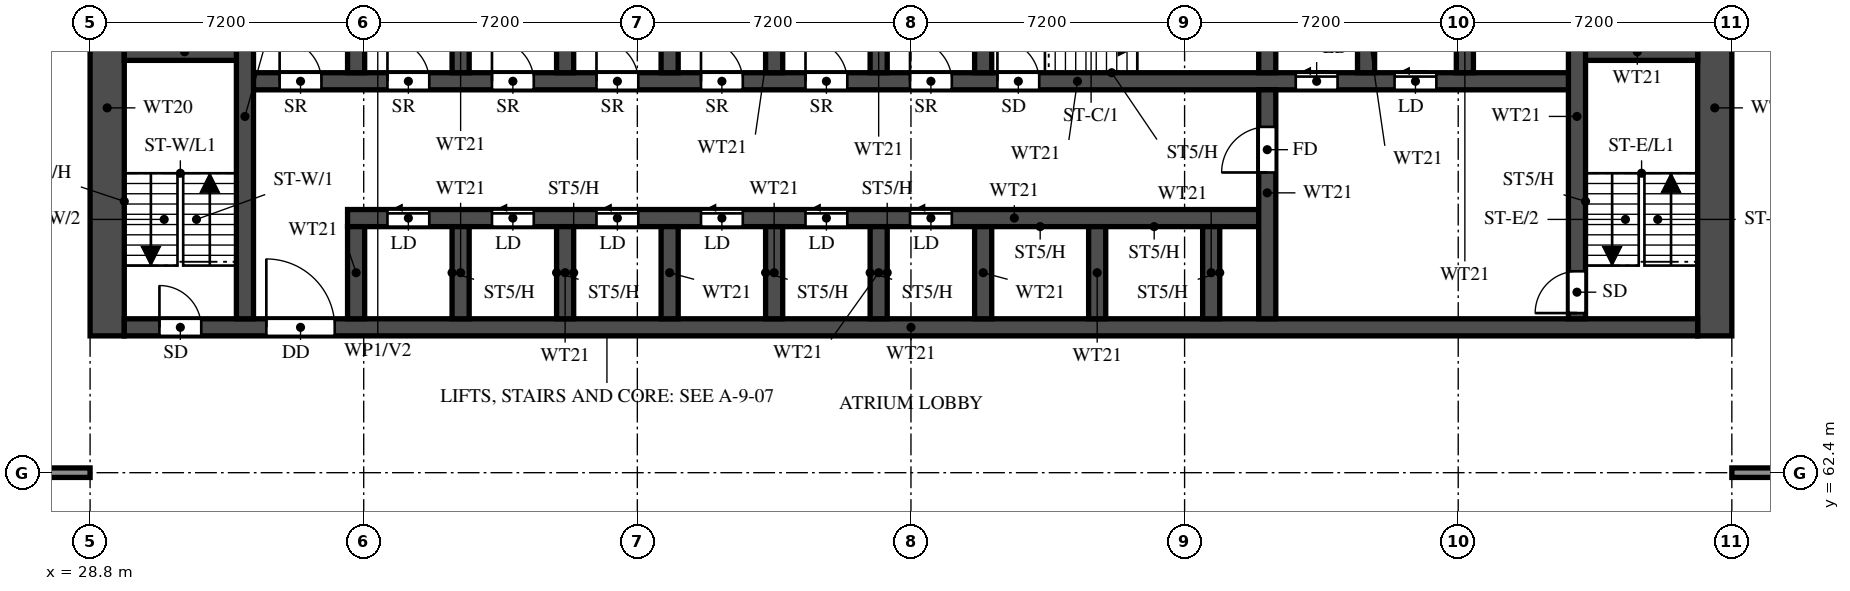
"""IFC4 building model, lengths in metres.
Left out: names, types, materials, properties, quantities, classifications, styles, units other than length and angle.
Written with IfcOpenShell. Run it as: python <this file> out.ifc"""

import sys

from ifc_helpers import new_model, si_unit, direction, frame, frame_2d, origin, place, context, subcontext, project, spatial, rectangle, extrude, element, fill, save


model = new_model("IFC4")
c1 = context("Model", 3, precision=1e-05, world=origin(), true_north=direction((0.0, 1.0)))
c2 = subcontext(c1, "Body", "Model", "MODEL_VIEW")
j1 = project(units=[si_unit("LENGTHUNIT", "METRE"), si_unit("PLANEANGLEUNIT", "RADIAN")], contexts=[c1])
p1 = place(None, origin())
s1 = spatial("IfcSite", under=j1, at=p1, CompositionType="ELEMENT")
p2 = place(p1, origin())
s2 = spatial("IfcBuilding", under=s1, at=p2, CompositionType="ELEMENT")
p3 = place(p2, frame((0.0, 0.0, 27.0)))
s3 = spatial("IfcBuildingStorey", under=s2, at=p3, CompositionType="ELEMENT", Elevation=27.0)
for number, where, z_axis, x_axis in (
    (1, (29.25, 66.0, 0.0), (0.0, 0.0, 1.0), (0.0, 1.0, 0.0)),
    (2, (71.55, 66.0, 0.0), (0.0, 0.0, 1.0), (0.0, 1.0, 0.0)),
):
    element("IfcWall", number, at=place(p3, frame(where, z_axis=z_axis, x_axis=x_axis)), inside=s3, PredefinedType="SHEAR", context=c2, shape_type="SweptSolid", body=[
        extrude(rectangle(XDim=12.0, YDim=0.9, at=frame_2d((6.0, 0.0))), origin(), (0.0, 0.0, 1.0), 3.18),
    ])
p4 = place(p3, frame((29.7, 66.225, 0.0), z_axis=(0.0, 0.0, 1.0), x_axis=(1.0, 0.0, 0.0)))
e3 = element("IfcWall", 3, at=p4, inside=s3, PredefinedType="SHEAR", context=c2, shape_type="SweptSolid", body=[
    extrude(rectangle(XDim=41.4, YDim=0.45, at=frame_2d((20.7, 0.0))), origin(), (0.0, 0.0, 1.0), 3.18),
])
p5 = place(p4, frame((0.925, 0.0, 0.0)))
e4 = element("IfcOpeningElement", 4, at=p5, cuts=e3, PredefinedType="OPENING", context=c2, shape_type="SweptSolid", body=[
    extrude(rectangle(XDim=1.1, YDim=2.1, at=frame_2d((0.55, 1.05))), frame((0.0, 0.235, 0.0), z_axis=(0.0, -1.0, 0.0), x_axis=(1.0, 0.0, 0.0)), (0.0, 0.0, 1.0), 0.47),
])
p6 = place(p4, frame((3.738, 0.0, 0.0)))
e5 = element("IfcOpeningElement", 5, at=p6, cuts=e3, PredefinedType="OPENING", context=c2, shape_type="SweptSolid", body=[
    extrude(rectangle(XDim=1.8, YDim=2.1, at=frame_2d((0.9, 1.05))), frame((0.0, 0.235, 0.0), z_axis=(0.0, -1.0, 0.0), x_axis=(1.0, 0.0, 0.0)), (0.0, 0.0, 1.0), 0.47),
])
p7 = place(p3, frame((35.575, 69.1, 0.0), z_axis=(0.0, 0.0, 1.0), x_axis=(1.0, 0.0, 0.0)))
e6 = element("IfcWall", 6, at=p7, inside=s3, PredefinedType="SHEAR", context=c2, shape_type="SweptSolid", body=[
    extrude(rectangle(XDim=24.2, YDim=0.45, at=frame_2d((12.1, 0.0))), origin(), (0.0, 0.0, 1.0), 3.18),
])
p8 = place(p7, frame((1.05, 0.0, 0.0)))
e7 = element("IfcOpeningElement", 7, at=p8, cuts=e6, PredefinedType="OPENING", context=c2, shape_type="SweptSolid", body=[
    extrude(rectangle(XDim=1.1, YDim=2.1, at=frame_2d((0.55, 1.05))), frame((0.0, 0.235, 0.0), z_axis=(0.0, -1.0, 0.0), x_axis=(1.0, 0.0, 0.0)), (0.0, 0.0, 1.0), 0.47),
])
p9 = place(p7, frame((3.8, 0.0, 0.0)))
e8 = element("IfcOpeningElement", 8, at=p9, cuts=e6, PredefinedType="OPENING", context=c2, shape_type="SweptSolid", body=[
    extrude(rectangle(XDim=1.1, YDim=2.1, at=frame_2d((0.55, 1.05))), frame((0.0, 0.235, 0.0), z_axis=(0.0, -1.0, 0.0), x_axis=(1.0, 0.0, 0.0)), (0.0, 0.0, 1.0), 0.47),
])
p10 = place(p7, frame((6.55, 0.0, 0.0)))
e9 = element("IfcOpeningElement", 9, at=p10, cuts=e6, PredefinedType="OPENING", context=c2, shape_type="SweptSolid", body=[
    extrude(rectangle(XDim=1.1, YDim=2.1, at=frame_2d((0.55, 1.05))), frame((0.0, 0.235, 0.0), z_axis=(0.0, -1.0, 0.0), x_axis=(1.0, 0.0, 0.0)), (0.0, 0.0, 1.0), 0.47),
])
p11 = place(p7, frame((9.3, 0.0, 0.0)))
e10 = element("IfcOpeningElement", 10, at=p11, cuts=e6, PredefinedType="OPENING", context=c2, shape_type="SweptSolid", body=[
    extrude(rectangle(XDim=1.1, YDim=2.1, at=frame_2d((0.55, 1.05))), frame((0.0, 0.235, 0.0), z_axis=(0.0, -1.0, 0.0), x_axis=(1.0, 0.0, 0.0)), (0.0, 0.0, 1.0), 0.47),
])
p12 = place(p7, frame((12.05, 0.0, 0.0)))
e11 = element("IfcOpeningElement", 11, at=p12, cuts=e6, PredefinedType="OPENING", context=c2, shape_type="SweptSolid", body=[
    extrude(rectangle(XDim=1.1, YDim=2.1, at=frame_2d((0.55, 1.05))), frame((0.0, 0.235, 0.0), z_axis=(0.0, -1.0, 0.0), x_axis=(1.0, 0.0, 0.0)), (0.0, 0.0, 1.0), 0.47),
])
p13 = place(p7, frame((14.8, 0.0, 0.0)))
e12 = element("IfcOpeningElement", 12, at=p13, cuts=e6, PredefinedType="OPENING", context=c2, shape_type="SweptSolid", body=[
    extrude(rectangle(XDim=1.1, YDim=2.1, at=frame_2d((0.55, 1.05))), frame((0.0, 0.235, 0.0), z_axis=(0.0, -1.0, 0.0), x_axis=(1.0, 0.0, 0.0)), (0.0, 0.0, 1.0), 0.47),
])
p14 = place(p3, frame((32.875, 72.7, 0.0), z_axis=(0.0, 0.0, 1.0), x_axis=(1.0, 0.0, 0.0)))
e13 = element("IfcWall", 13, at=p14, inside=s3, PredefinedType="SHEAR", context=c2, shape_type="SweptSolid", body=[
    extrude(rectangle(XDim=35.05, YDim=0.45, at=frame_2d((17.525, 0.0))), origin(), (0.0, 0.0, 1.0), 3.18),
])
p15 = place(p14, frame((19.8, 0.0, 0.0)))
e14 = element("IfcOpeningElement", 14, at=p15, cuts=e13, PredefinedType="OPENING", context=c2, shape_type="SweptSolid", body=[
    extrude(rectangle(XDim=1.1, YDim=2.1, at=frame_2d((0.55, 1.05))), frame((0.0, 0.235, 0.0), z_axis=(0.0, -1.0, 0.0), x_axis=(1.0, 0.0, 0.0)), (0.0, 0.0, 1.0), 0.47),
])
p16 = place(p14, frame((27.65, 0.0, 0.0)))
e15 = element("IfcOpeningElement", 15, at=p16, cuts=e13, PredefinedType="OPENING", context=c2, shape_type="SweptSolid", body=[
    extrude(rectangle(XDim=1.1, YDim=2.1, at=frame_2d((0.55, 1.05))), frame((0.0, 0.235, 0.0), z_axis=(0.0, -1.0, 0.0), x_axis=(1.0, 0.0, 0.0)), (0.0, 0.0, 1.0), 0.47),
])
p17 = place(p14, frame((30.25, 0.0, 0.0)))
e16 = element("IfcOpeningElement", 16, at=p17, cuts=e13, PredefinedType="OPENING", context=c2, shape_type="SweptSolid", body=[
    extrude(rectangle(XDim=1.1, YDim=2.1, at=frame_2d((0.55, 1.05))), frame((0.0, 0.235, 0.0), z_axis=(0.0, -1.0, 0.0), x_axis=(1.0, 0.0, 0.0)), (0.0, 0.0, 1.0), 0.47),
])
p18 = place(p14, frame((3.75, 0.0, 0.0)))
e17 = element("IfcOpeningElement", 17, at=p18, cuts=e13, PredefinedType="OPENING", context=c2, shape_type="SweptSolid", body=[
    extrude(rectangle(XDim=1.1, YDim=2.1, at=frame_2d((0.55, 1.05))), frame((0.0, 0.235, 0.0), z_axis=(0.0, -1.0, 0.0), x_axis=(1.0, 0.0, 0.0)), (0.0, 0.0, 1.0), 0.47),
])
p19 = place(p14, frame((6.5, 0.0, 0.0)))
e18 = element("IfcOpeningElement", 18, at=p19, cuts=e13, PredefinedType="OPENING", context=c2, shape_type="SweptSolid", body=[
    extrude(rectangle(XDim=1.1, YDim=2.1, at=frame_2d((0.55, 1.05))), frame((0.0, 0.235, 0.0), z_axis=(0.0, -1.0, 0.0), x_axis=(1.0, 0.0, 0.0)), (0.0, 0.0, 1.0), 0.47),
])
p20 = place(p14, frame((9.25, 0.0, 0.0)))
e19 = element("IfcOpeningElement", 19, at=p20, cuts=e13, PredefinedType="OPENING", context=c2, shape_type="SweptSolid", body=[
    extrude(rectangle(XDim=1.1, YDim=2.1, at=frame_2d((0.55, 1.05))), frame((0.0, 0.235, 0.0), z_axis=(0.0, -1.0, 0.0), x_axis=(1.0, 0.0, 0.0)), (0.0, 0.0, 1.0), 0.47),
])
p21 = place(p14, frame((12.0, 0.0, 0.0)))
e20 = element("IfcOpeningElement", 20, at=p21, cuts=e13, PredefinedType="OPENING", context=c2, shape_type="SweptSolid", body=[
    extrude(rectangle(XDim=1.1, YDim=2.1, at=frame_2d((0.55, 1.05))), frame((0.0, 0.235, 0.0), z_axis=(0.0, -1.0, 0.0), x_axis=(1.0, 0.0, 0.0)), (0.0, 0.0, 1.0), 0.47),
])
p22 = place(p14, frame((14.75, 0.0, 0.0)))
e21 = element("IfcOpeningElement", 21, at=p22, cuts=e13, PredefinedType="OPENING", context=c2, shape_type="SweptSolid", body=[
    extrude(rectangle(XDim=1.1, YDim=2.1, at=frame_2d((0.55, 1.05))), frame((0.0, 0.235, 0.0), z_axis=(0.0, -1.0, 0.0), x_axis=(1.0, 0.0, 0.0)), (0.0, 0.0, 1.0), 0.47),
])
p23 = place(p14, frame((17.5, 0.0, 0.0)))
e22 = element("IfcOpeningElement", 22, at=p23, cuts=e13, PredefinedType="OPENING", context=c2, shape_type="SweptSolid", body=[
    extrude(rectangle(XDim=1.1, YDim=2.1, at=frame_2d((0.55, 1.05))), frame((0.0, 0.235, 0.0), z_axis=(0.0, -1.0, 0.0), x_axis=(1.0, 0.0, 0.0)), (0.0, 0.0, 1.0), 0.47),
])
p24 = place(p14, frame((0.913, 0.0, 0.0)))
e23 = element("IfcOpeningElement", 23, at=p24, cuts=e13, PredefinedType="OPENING", context=c2, shape_type="SweptSolid", body=[
    extrude(rectangle(XDim=1.1, YDim=2.1, at=frame_2d((0.55, 1.05))), frame((0.0, 0.235, 0.0), z_axis=(0.0, -1.0, 0.0), x_axis=(1.0, 0.0, 0.0)), (0.0, 0.0, 1.0), 0.47),
])
for number, where, z_axis, x_axis in (
    (24, (29.7, 73.475, 0.0), (0.0, 0.0, 1.0), (1.0, 0.0, 0.0)),
    (25, (67.925, 73.475, 0.0), (0.0, 0.0, 1.0), (1.0, 0.0, 0.0)),
):
    element("IfcWall", number, at=place(p3, frame(where, z_axis=z_axis, x_axis=x_axis)), inside=s3, PredefinedType="SHEAR", context=c2, shape_type="SweptSolid", body=[
        extrude(rectangle(XDim=3.175, YDim=0.45, at=frame_2d((1.587, 0.0))), origin(), (0.0, 0.0, 1.0), 3.18),
    ])
p25 = place(p3, frame((32.875, 66.45, 0.0), z_axis=(0.0, 0.0, 1.0), x_axis=(0.0, 1.0, 0.0)))
e26 = element("IfcWall", 26, at=p25, inside=s3, PredefinedType="SHEAR", context=c2, shape_type="SweptSolid", body=[
    extrude(rectangle(XDim=10.65, YDim=0.45, at=frame_2d((5.325, 0.0))), origin(), (0.0, 0.0, 1.0), 3.18),
])
p26 = place(p3, frame((67.925, 66.45, 0.0), z_axis=(0.0, 0.0, 1.0), x_axis=(0.0, 1.0, 0.0)))
e27 = element("IfcWall", 27, at=p26, inside=s3, PredefinedType="SHEAR", context=c2, shape_type="SweptSolid", body=[
    extrude(rectangle(XDim=10.65, YDim=0.45, at=frame_2d((5.325, 0.0))), origin(), (0.0, 0.0, 1.0), 3.18),
])
p27 = place(p26, frame((0.15, 0.0, 0.0)))
e28 = element("IfcOpeningElement", 28, at=p27, cuts=e27, PredefinedType="OPENING", context=c2, shape_type="SweptSolid", body=[
    extrude(rectangle(XDim=1.1, YDim=2.1, at=frame_2d((0.55, 1.05))), frame((0.0, 0.235, 0.0), z_axis=(0.0, -1.0, 0.0), x_axis=(1.0, 0.0, 0.0)), (0.0, 0.0, 1.0), 0.47),
])
p28 = place(p3, frame((59.775, 66.45, 0.0), z_axis=(0.0, 0.0, 1.0), x_axis=(0.0, 1.0, 0.0)))
e29 = element("IfcWall", 29, at=p28, inside=s3, PredefinedType="SHEAR", context=c2, shape_type="SweptSolid", body=[
    extrude(rectangle(XDim=6.025, YDim=0.45, at=frame_2d((3.013, 0.0))), origin(), (0.0, 0.0, 1.0), 3.18),
])
p29 = place(p28, frame((3.85, 0.0, 0.0)))
e30 = element("IfcOpeningElement", 30, at=p29, cuts=e29, PredefinedType="OPENING", context=c2, shape_type="SweptSolid", body=[
    extrude(rectangle(XDim=1.2, YDim=2.1, at=frame_2d((0.6, 1.05))), frame((0.0, 0.235, 0.0), z_axis=(0.0, -1.0, 0.0), x_axis=(1.0, 0.0, 0.0)), (0.0, 0.0, 1.0), 0.47),
])
p30 = place(p3, frame((59.775, 72.925, 0.0), z_axis=(0.0, 0.0, 1.0), x_axis=(0.0, 1.0, 0.0)))
e31 = element("IfcWall", 31, at=p30, inside=s3, PredefinedType="SHEAR", context=c2, shape_type="SweptSolid", body=[
    extrude(rectangle(XDim=2.95, YDim=0.45, at=frame_2d((1.475, 0.0))), origin(), (0.0, 0.0, 1.0), 3.18),
])
for number, where, z_axis, x_axis in (
    (32, (35.8, 66.45, 0.0), (0.0, 0.0, 1.0), (0.0, 1.0, 0.0)),
    (33, (38.55, 66.45, 0.0), (0.0, 0.0, 1.0), (0.0, 1.0, 0.0)),
    (34, (41.3, 66.45, 0.0), (0.0, 0.0, 1.0), (0.0, 1.0, 0.0)),
    (35, (44.05, 66.45, 0.0), (0.0, 0.0, 1.0), (0.0, 1.0, 0.0)),
    (36, (46.8, 66.45, 0.0), (0.0, 0.0, 1.0), (0.0, 1.0, 0.0)),
    (37, (49.55, 66.45, 0.0), (0.0, 0.0, 1.0), (0.0, 1.0, 0.0)),
    (38, (52.3, 66.45, 0.0), (0.0, 0.0, 1.0), (0.0, 1.0, 0.0)),
    (39, (55.3, 66.45, 0.0), (0.0, 0.0, 1.0), (0.0, 1.0, 0.0)),
    (40, (58.3, 66.45, 0.0), (0.0, 0.0, 1.0), (0.0, 1.0, 0.0)),
):
    element("IfcWall", number, at=place(p3, frame(where, z_axis=z_axis, x_axis=x_axis)), inside=s3, PredefinedType="SHEAR", context=c2, shape_type="SweptSolid", body=[
        extrude(rectangle(XDim=2.425, YDim=0.45, at=frame_2d((1.212, 0.0))), origin(), (0.0, 0.0, 1.0), 3.18),
    ])
for number, where, z_axis, x_axis in (
    (41, (35.8, 72.925, 0.0), (0.0, 0.0, 1.0), (0.0, 1.0, 0.0)),
    (42, (38.55, 72.925, 0.0), (0.0, 0.0, 1.0), (0.0, 1.0, 0.0)),
    (43, (41.3, 72.925, 0.0), (0.0, 0.0, 1.0), (0.0, 1.0, 0.0)),
    (44, (44.05, 72.925, 0.0), (0.0, 0.0, 1.0), (0.0, 1.0, 0.0)),
    (45, (46.8, 72.925, 0.0), (0.0, 0.0, 1.0), (0.0, 1.0, 0.0)),
    (46, (49.55, 72.925, 0.0), (0.0, 0.0, 1.0), (0.0, 1.0, 0.0)),
    (47, (52.3, 72.925, 0.0), (0.0, 0.0, 1.0), (0.0, 1.0, 0.0)),
    (48, (62.375, 72.925, 0.0), (0.0, 0.0, 1.0), (0.0, 1.0, 0.0)),
    (49, (64.975, 72.925, 0.0), (0.0, 0.0, 1.0), (0.0, 1.0, 0.0)),
):
    element("IfcWall", number, at=place(p3, frame(where, z_axis=z_axis, x_axis=x_axis)), inside=s3, PredefinedType="SHEAR", context=c2, shape_type="SweptSolid", body=[
        extrude(rectangle(XDim=2.95, YDim=0.45, at=frame_2d((1.475, 0.0))), origin(), (0.0, 0.0, 1.0), 3.18),
    ])
p31 = place(p3, frame((14.57, 62.4, 0.0), z_axis=(0.0, 0.0, 1.0), x_axis=(1.0, 0.0, 0.0)))
e50 = element("IfcWall", 50, at=p31, inside=s3, PredefinedType="SOLIDWALL", context=c2, shape_type="SweptSolid", body=[
    extrude(rectangle(XDim=14.23, YDim=0.25, at=frame_2d((7.115, 0.0))), origin(), (0.0, 0.0, 1.0), 3.18),
])
p32 = place(p31, frame((5.08, 0.0, 0.0)))
e51 = element("IfcOpeningElement", 51, at=p32, cuts=e50, PredefinedType="OPENING", context=c2, shape_type="SweptSolid", body=[
    extrude(rectangle(XDim=1.1, YDim=2.1, at=frame_2d((0.55, 1.05))), frame((0.0, 0.135, 0.0), z_axis=(0.0, -1.0, 0.0), x_axis=(1.0, 0.0, 0.0)), (0.0, 0.0, 1.0), 0.27),
])
p33 = place(p3, frame((72.0, 62.4, 0.0), z_axis=(0.0, 0.0, 1.0), x_axis=(1.0, 0.0, 0.0)))
e52 = element("IfcWall", 52, at=p33, inside=s3, PredefinedType="SOLIDWALL", context=c2, shape_type="SweptSolid", body=[
    extrude(rectangle(XDim=14.23, YDim=0.25, at=frame_2d((7.115, 0.0))), origin(), (0.0, 0.0, 1.0), 3.18),
])
p34 = place(p33, frame((5.25, 0.0, 0.0)))
e53 = element("IfcOpeningElement", 53, at=p34, cuts=e52, PredefinedType="OPENING", context=c2, shape_type="SweptSolid", body=[
    extrude(rectangle(XDim=1.1, YDim=2.1, at=frame_2d((0.55, 1.05))), frame((0.0, 0.135, 0.0), z_axis=(0.0, -1.0, 0.0), x_axis=(1.0, 0.0, 0.0)), (0.0, 0.0, 1.0), 0.27),
])
p35 = place(p5, origin())
e54 = element("IfcDoor", 54, at=p35, inside=s3, OperationType="SINGLE_SWING_LEFT", PredefinedType="DOOR", context=c2, shape_type="SweptSolid", body=[
    extrude(rectangle(XDim=1.1, YDim=2.1, at=frame_2d((0.55, 1.05))), frame((0.0, 0.025, 0.0), z_axis=(0.0, -1.0, 0.0), x_axis=(1.0, 0.0, 0.0)), (0.0, 0.0, 1.0), 0.05),
])
fill(e4, e54)
p36 = place(p15, origin())
e55 = element("IfcDoor", 55, at=p36, inside=s3, OperationType="SINGLE_SWING_LEFT", PredefinedType="DOOR", context=c2, shape_type="SweptSolid", body=[
    extrude(rectangle(XDim=1.1, YDim=2.1, at=frame_2d((0.55, 1.05))), frame((0.0, 0.025, 0.0), z_axis=(0.0, -1.0, 0.0), x_axis=(1.0, 0.0, 0.0)), (0.0, 0.0, 1.0), 0.05),
])
fill(e14, e55)
p37 = place(p27, origin())
e56 = element("IfcDoor", 56, at=p37, inside=s3, OperationType="SINGLE_SWING_LEFT", PredefinedType="DOOR", context=c2, shape_type="SweptSolid", body=[
    extrude(rectangle(XDim=1.1, YDim=2.1, at=frame_2d((0.55, 1.05))), frame((0.0, 0.025, 0.0), z_axis=(0.0, -1.0, 0.0), x_axis=(1.0, 0.0, 0.0)), (0.0, 0.0, 1.0), 0.05),
])
fill(e28, e56)
p38 = place(p6, origin())
e57 = element("IfcDoor", 57, at=p38, inside=s3, OperationType="DOUBLE_DOOR_SINGLE_SWING", PredefinedType="DOOR", context=c2, shape_type="SweptSolid", body=[
    extrude(rectangle(XDim=1.8, YDim=2.1, at=frame_2d((0.9, 1.05))), frame((0.0, 0.025, 0.0), z_axis=(0.0, -1.0, 0.0), x_axis=(1.0, 0.0, 0.0)), (0.0, 0.0, 1.0), 0.05),
])
fill(e5, e57)
p39 = place(p29, origin())
e58 = element("IfcDoor", 58, at=p39, inside=s3, OperationType="SINGLE_SWING_RIGHT", PredefinedType="DOOR", context=c2, shape_type="SweptSolid", body=[
    extrude(rectangle(XDim=1.2, YDim=2.1, at=frame_2d((0.6, 1.05))), frame((0.0, 0.025, 0.0), z_axis=(0.0, -1.0, 0.0), x_axis=(1.0, 0.0, 0.0)), (0.0, 0.0, 1.0), 0.05),
])
fill(e30, e58)
p40 = place(p16, origin())
e59 = element("IfcDoor", 59, at=p40, inside=s3, OperationType="SLIDING_TO_LEFT", PredefinedType="DOOR", context=c2, shape_type="SweptSolid", body=[
    extrude(rectangle(XDim=1.1, YDim=2.1, at=frame_2d((0.55, 1.05))), frame((0.0, 0.025, 0.0), z_axis=(0.0, -1.0, 0.0), x_axis=(1.0, 0.0, 0.0)), (0.0, 0.0, 1.0), 0.05),
])
fill(e15, e59)
p41 = place(p17, origin())
e60 = element("IfcDoor", 60, at=p41, inside=s3, OperationType="SLIDING_TO_LEFT", PredefinedType="DOOR", context=c2, shape_type="SweptSolid", body=[
    extrude(rectangle(XDim=1.1, YDim=2.1, at=frame_2d((0.55, 1.05))), frame((0.0, 0.025, 0.0), z_axis=(0.0, -1.0, 0.0), x_axis=(1.0, 0.0, 0.0)), (0.0, 0.0, 1.0), 0.05),
])
fill(e16, e60)
p42 = place(p8, origin())
e61 = element("IfcDoor", 61, at=p42, inside=s3, OperationType="SLIDING_TO_LEFT", PredefinedType="DOOR", context=c2, shape_type="SweptSolid", body=[
    extrude(rectangle(XDim=1.1, YDim=2.1, at=frame_2d((0.55, 1.05))), frame((0.0, 0.025, 0.0), z_axis=(0.0, -1.0, 0.0), x_axis=(1.0, 0.0, 0.0)), (0.0, 0.0, 1.0), 0.05),
])
fill(e7, e61)
p43 = place(p9, origin())
e62 = element("IfcDoor", 62, at=p43, inside=s3, OperationType="SLIDING_TO_LEFT", PredefinedType="DOOR", context=c2, shape_type="SweptSolid", body=[
    extrude(rectangle(XDim=1.1, YDim=2.1, at=frame_2d((0.55, 1.05))), frame((0.0, 0.025, 0.0), z_axis=(0.0, -1.0, 0.0), x_axis=(1.0, 0.0, 0.0)), (0.0, 0.0, 1.0), 0.05),
])
fill(e8, e62)
p44 = place(p10, origin())
e63 = element("IfcDoor", 63, at=p44, inside=s3, OperationType="SLIDING_TO_LEFT", PredefinedType="DOOR", context=c2, shape_type="SweptSolid", body=[
    extrude(rectangle(XDim=1.1, YDim=2.1, at=frame_2d((0.55, 1.05))), frame((0.0, 0.025, 0.0), z_axis=(0.0, -1.0, 0.0), x_axis=(1.0, 0.0, 0.0)), (0.0, 0.0, 1.0), 0.05),
])
fill(e9, e63)
p45 = place(p11, origin())
e64 = element("IfcDoor", 64, at=p45, inside=s3, OperationType="SLIDING_TO_LEFT", PredefinedType="DOOR", context=c2, shape_type="SweptSolid", body=[
    extrude(rectangle(XDim=1.1, YDim=2.1, at=frame_2d((0.55, 1.05))), frame((0.0, 0.025, 0.0), z_axis=(0.0, -1.0, 0.0), x_axis=(1.0, 0.0, 0.0)), (0.0, 0.0, 1.0), 0.05),
])
fill(e10, e64)
p46 = place(p12, origin())
e65 = element("IfcDoor", 65, at=p46, inside=s3, OperationType="SLIDING_TO_LEFT", PredefinedType="DOOR", context=c2, shape_type="SweptSolid", body=[
    extrude(rectangle(XDim=1.1, YDim=2.1, at=frame_2d((0.55, 1.05))), frame((0.0, 0.025, 0.0), z_axis=(0.0, -1.0, 0.0), x_axis=(1.0, 0.0, 0.0)), (0.0, 0.0, 1.0), 0.05),
])
fill(e11, e65)
p47 = place(p13, origin())
e66 = element("IfcDoor", 66, at=p47, inside=s3, OperationType="SLIDING_TO_LEFT", PredefinedType="DOOR", context=c2, shape_type="SweptSolid", body=[
    extrude(rectangle(XDim=1.1, YDim=2.1, at=frame_2d((0.55, 1.05))), frame((0.0, 0.025, 0.0), z_axis=(0.0, -1.0, 0.0), x_axis=(1.0, 0.0, 0.0)), (0.0, 0.0, 1.0), 0.05),
])
fill(e12, e66)
p48 = place(p18, origin())
e67 = element("IfcDoor", 67, at=p48, inside=s3, OperationType="SINGLE_SWING_LEFT", PredefinedType="DOOR", context=c2, shape_type="SweptSolid", body=[
    extrude(rectangle(XDim=1.1, YDim=2.1, at=frame_2d((0.55, 1.05))), frame((0.0, 0.025, 0.0), z_axis=(0.0, -1.0, 0.0), x_axis=(1.0, 0.0, 0.0)), (0.0, 0.0, 1.0), 0.05),
])
fill(e17, e67)
p49 = place(p19, origin())
e68 = element("IfcDoor", 68, at=p49, inside=s3, OperationType="SINGLE_SWING_LEFT", PredefinedType="DOOR", context=c2, shape_type="SweptSolid", body=[
    extrude(rectangle(XDim=1.1, YDim=2.1, at=frame_2d((0.55, 1.05))), frame((0.0, 0.025, 0.0), z_axis=(0.0, -1.0, 0.0), x_axis=(1.0, 0.0, 0.0)), (0.0, 0.0, 1.0), 0.05),
])
fill(e18, e68)
p50 = place(p20, origin())
e69 = element("IfcDoor", 69, at=p50, inside=s3, OperationType="SINGLE_SWING_LEFT", PredefinedType="DOOR", context=c2, shape_type="SweptSolid", body=[
    extrude(rectangle(XDim=1.1, YDim=2.1, at=frame_2d((0.55, 1.05))), frame((0.0, 0.025, 0.0), z_axis=(0.0, -1.0, 0.0), x_axis=(1.0, 0.0, 0.0)), (0.0, 0.0, 1.0), 0.05),
])
fill(e19, e69)
p51 = place(p21, origin())
e70 = element("IfcDoor", 70, at=p51, inside=s3, OperationType="SINGLE_SWING_LEFT", PredefinedType="DOOR", context=c2, shape_type="SweptSolid", body=[
    extrude(rectangle(XDim=1.1, YDim=2.1, at=frame_2d((0.55, 1.05))), frame((0.0, 0.025, 0.0), z_axis=(0.0, -1.0, 0.0), x_axis=(1.0, 0.0, 0.0)), (0.0, 0.0, 1.0), 0.05),
])
fill(e20, e70)
p52 = place(p22, origin())
e71 = element("IfcDoor", 71, at=p52, inside=s3, OperationType="SINGLE_SWING_LEFT", PredefinedType="DOOR", context=c2, shape_type="SweptSolid", body=[
    extrude(rectangle(XDim=1.1, YDim=2.1, at=frame_2d((0.55, 1.05))), frame((0.0, 0.025, 0.0), z_axis=(0.0, -1.0, 0.0), x_axis=(1.0, 0.0, 0.0)), (0.0, 0.0, 1.0), 0.05),
])
fill(e21, e71)
p53 = place(p23, origin())
e72 = element("IfcDoor", 72, at=p53, inside=s3, OperationType="SINGLE_SWING_LEFT", PredefinedType="DOOR", context=c2, shape_type="SweptSolid", body=[
    extrude(rectangle(XDim=1.1, YDim=2.1, at=frame_2d((0.55, 1.05))), frame((0.0, 0.025, 0.0), z_axis=(0.0, -1.0, 0.0), x_axis=(1.0, 0.0, 0.0)), (0.0, 0.0, 1.0), 0.05),
])
fill(e22, e72)
p54 = place(p24, origin())
e73 = element("IfcDoor", 73, at=p54, inside=s3, OperationType="SINGLE_SWING_LEFT", PredefinedType="DOOR", context=c2, shape_type="SweptSolid", body=[
    extrude(rectangle(XDim=1.1, YDim=2.1, at=frame_2d((0.55, 1.05))), frame((0.0, 0.025, 0.0), z_axis=(0.0, -1.0, 0.0), x_axis=(1.0, 0.0, 0.0)), (0.0, 0.0, 1.0), 0.05),
])
fill(e23, e73)
save(model, sys.argv[1])
